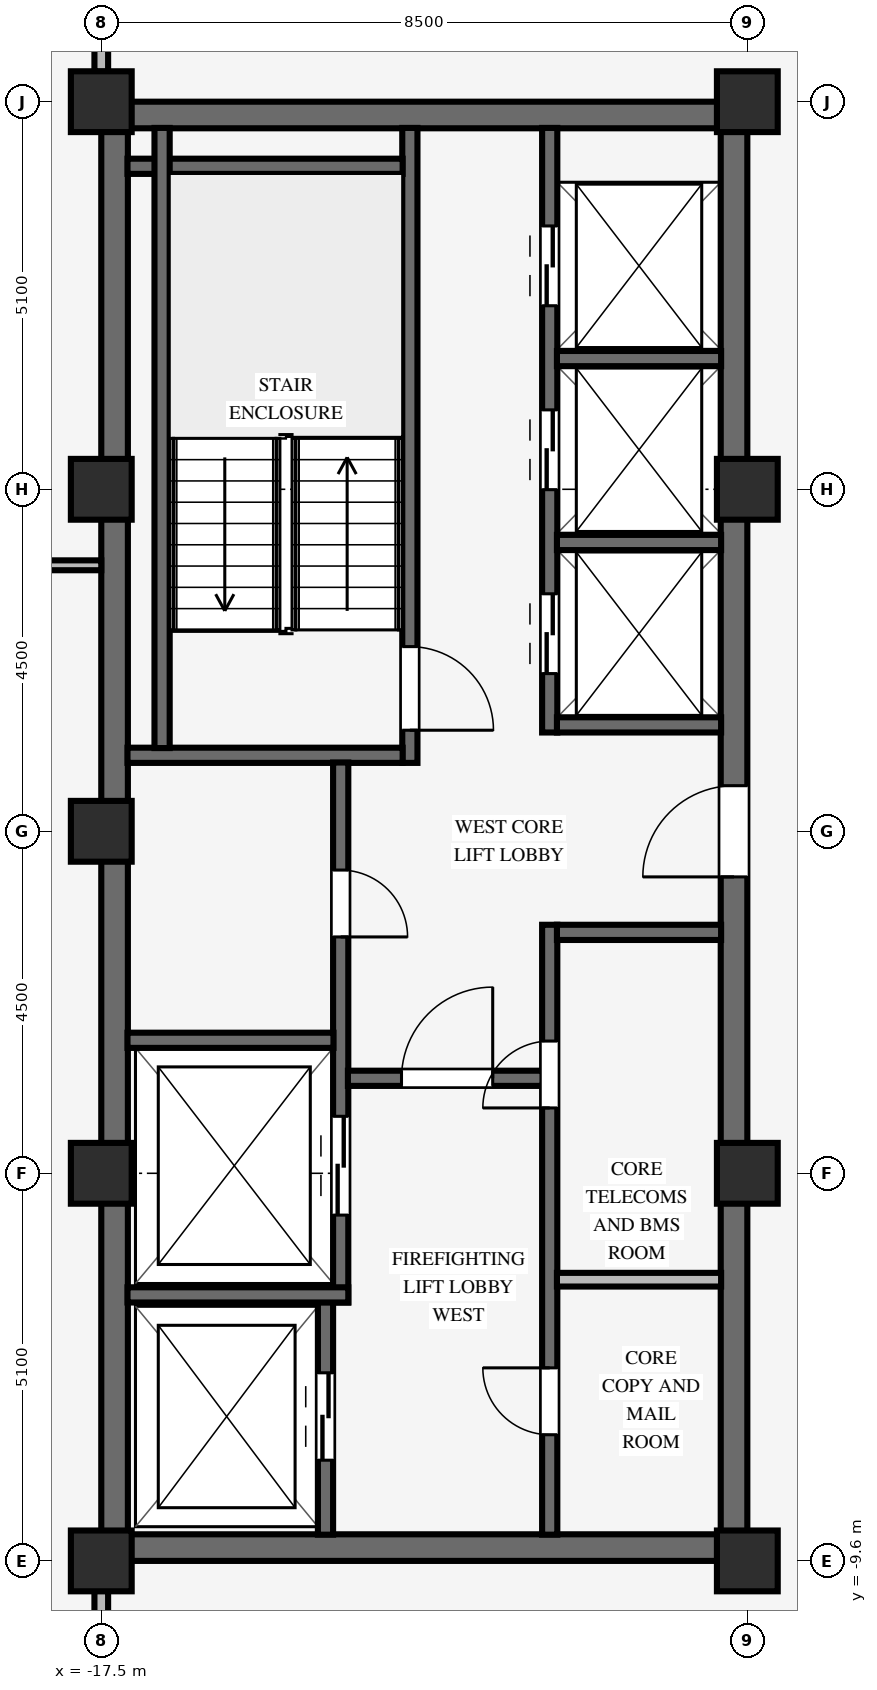
"""IFC4 building model, lengths in metres.
Left out: names, types, materials, properties, quantities, classifications, styles, units other than length and angle.
Written with IfcOpenShell. Run it as: python <this file> out.ifc"""

import sys

from ifc_helpers import new_model, si_unit, direction, frame, frame_2d, origin, origin_2d, place, context, subcontext, project, spatial, rectangle, extrude, source, transform, mapped, element, fill, save


model = new_model("IFC4")
c1 = context("Model", 3, precision=1e-05, world=origin(), true_north=direction((0.0, 1.0)))
c2 = subcontext(c1, "Body", "Model", "MODEL_VIEW")
j1 = project(units=[si_unit("LENGTHUNIT", "METRE"), si_unit("PLANEANGLEUNIT", "RADIAN")], contexts=[c1])
p1 = place(None, origin())
s1 = spatial("IfcSite", under=j1, at=p1, CompositionType="ELEMENT")
p2 = place(p1, origin())
s2 = spatial("IfcBuilding", under=s1, at=p2, CompositionType="ELEMENT")
p3 = place(p2, frame((0.0, 0.0, 257.95)))
s3 = spatial("IfcBuildingStorey", under=s2, at=p3, CompositionType="ELEMENT", Elevation=257.95)
for number, where, z_axis, x_axis in (
    (1, (-17.5, -9.425, 0.0), (0.0, 0.0, 1.0), (1.0, 0.0, 0.0)),
    (2, (-17.5, 9.425, 0.0), (0.0, 0.0, 1.0), (1.0, 0.0, 0.0)),
):
    element("IfcWall", number, at=place(p3, frame(where, z_axis=z_axis, x_axis=x_axis)), inside=s3, PredefinedType="SHEAR", context=c2, shape_type="SweptSolid", body=[
        extrude(rectangle(XDim=8.5, YDim=0.35, at=frame_2d((4.25, 0.0))), origin(), (0.0, 0.0, 1.0), 3.37),
    ])
p4 = place(p3, frame((-17.325, -9.255, 0.0), z_axis=(0.0, 0.0, 1.0), x_axis=(0.0, 1.0, 0.0)))
e3 = element("IfcWall", 3, at=p4, inside=s3, PredefinedType="SHEAR", context=c2, shape_type="SweptSolid", body=[
    extrude(rectangle(XDim=18.51, YDim=0.35, at=frame_2d((9.255, 0.0))), origin(), (0.0, 0.0, 1.0), 3.37),
])
p5 = place(p3, frame((-9.175, -9.255, 0.0), z_axis=(0.0, 0.0, 1.0), x_axis=(0.0, 1.0, 0.0)))
e4 = element("IfcWall", 4, at=p5, inside=s3, PredefinedType="SHEAR", context=c2, shape_type="SweptSolid", body=[
    extrude(rectangle(XDim=18.51, YDim=0.35, at=frame_2d((9.255, 0.0))), origin(), (0.0, 0.0, 1.0), 3.37),
])
p6 = place(p5, frame((8.655, 0.0, 0.0)))
e5 = element("IfcOpeningElement", 5, at=p6, cuts=e4, PredefinedType="OPENING", context=c2, shape_type="SweptSolid", body=[
    extrude(rectangle(XDim=1.2, YDim=2.15, at=frame_2d((0.6, 1.075))), frame((0.0, 0.185, 0.0), z_axis=(0.0, -1.0, 0.0), x_axis=(1.0, 0.0, 0.0)), (0.0, 0.0, 1.0), 0.37),
])
for number, where, z_axis, x_axis in (
    (6, (-17.5, -9.6, 0.0), (0.0, 0.0, 1.0), (1.0, 0.0, 0.0)),
    (7, (-17.5, -4.5, 0.0), (0.0, 0.0, 1.0), (1.0, 0.0, 0.0)),
    (8, (-17.5, 4.5, 0.0), (0.0, 0.0, 1.0), (1.0, 0.0, 0.0)),
    (9, (-17.5, 9.6, 0.0), (0.0, 0.0, 1.0), (1.0, 0.0, 0.0)),
    (10, (-9.0, -9.6, 0.0), (0.0, 0.0, 1.0), (1.0, 0.0, 0.0)),
    (11, (-9.0, -4.5, 0.0), (0.0, 0.0, 1.0), (1.0, 0.0, 0.0)),
    (12, (-9.0, 4.5, 0.0), (0.0, 0.0, 1.0), (1.0, 0.0, 0.0)),
    (13, (-9.0, 9.6, 0.0), (0.0, 0.0, 1.0), (1.0, 0.0, 0.0)),
    (14, (-17.5, 0.0, 0.0), (0.0, 0.0, 1.0), (1.0, 0.0, 0.0)),
):
    element("IfcColumn", number, at=place(p3, frame(where, z_axis=z_axis, x_axis=x_axis)), inside=s3, PredefinedType="COLUMN", context=c2, shape_type="SweptSolid", body=[
        extrude(rectangle(XDim=0.8, YDim=0.8, at=origin_2d()), origin(), (0.0, 0.0, 1.0), 3.37),
    ])
p7 = place(p3, frame((-13.44, 0.9, 0.0), z_axis=(0.0, 0.0, 1.0), x_axis=(0.0, 1.0, 0.0)))
e15 = element("IfcWall", 15, at=p7, inside=s3, PredefinedType="SHEAR", context=c2, shape_type="SweptSolid", body=[
    extrude(rectangle(XDim=8.355, YDim=0.2, at=frame_2d((4.177, 0.0))), origin(), (0.0, 0.0, 1.0), 3.37),
])
p8 = place(p7, frame((1.53, 0.0, 0.0), z_axis=(0.0, 0.0, 1.0), x_axis=(-1.0, 0.0, 0.0)))
e16 = element("IfcOpeningElement", 16, at=p8, cuts=e15, PredefinedType="OPENING", context=c2, shape_type="SweptSolid", body=[
    extrude(rectangle(XDim=1.1, YDim=2.15, at=frame_2d((0.55, 1.075))), frame((0.0, 0.11, 0.0), z_axis=(0.0, -1.0, 0.0), x_axis=(1.0, 0.0, 0.0)), (0.0, 0.0, 1.0), 0.22),
])
for number, where, z_axis, x_axis in (
    (17, (-17.155, 1.0, 0.0), (0.0, 0.0, 1.0), (1.0, 0.0, 0.0)),
    (18, (-17.155, 8.75, 0.0), (0.0, 0.0, 1.0), (1.0, 0.0, 0.0)),
):
    element("IfcWall", number, at=place(p3, frame(where, z_axis=z_axis, x_axis=x_axis)), inside=s3, PredefinedType="SHEAR", context=c2, shape_type="SweptSolid", body=[
        extrude(rectangle(XDim=3.62, YDim=0.2, at=frame_2d((1.81, 0.0))), origin(), (0.0, 0.0, 1.0), 3.37),
    ])
p9 = place(p3, frame((-16.7, 1.095, 0.0), z_axis=(0.0, 0.0, 1.0), x_axis=(0.0, 1.0, 0.0)))
e19 = element("IfcWall", 19, at=p9, inside=s3, PredefinedType="SHEAR", context=c2, shape_type="SweptSolid", body=[
    extrude(rectangle(XDim=8.16, YDim=0.2, at=frame_2d((4.08, 0.0))), origin(), (0.0, 0.0, 1.0), 3.37),
])
p10 = place(p3, frame((-14.55, -9.255, 0.0), z_axis=(0.0, 0.0, 1.0), x_axis=(0.0, 1.0, 0.0)))
e20 = element("IfcWall", 20, at=p10, inside=s3, PredefinedType="SHEAR", context=c2, shape_type="SweptSolid", body=[
    extrude(rectangle(XDim=3.06, YDim=0.2, at=frame_2d((1.53, 0.0))), origin(), (0.0, 0.0, 1.0), 3.37),
])
p11 = place(p10, frame((0.98, 0.0, 0.0)))
e21 = element("IfcOpeningElement", 21, at=p11, cuts=e20, PredefinedType="OPENING", context=c2, shape_type="SweptSolid", body=[
    extrude(rectangle(XDim=1.15, YDim=2.15, at=frame_2d((0.575, 1.075))), frame((0.0, 0.11, 0.0), z_axis=(0.0, -1.0, 0.0), x_axis=(1.0, 0.0, 0.0)), (0.0, 0.0, 1.0), 0.22),
])
p12 = place(p3, frame((-14.35, -6.2, 0.0), z_axis=(0.0, 0.0, 1.0), x_axis=(0.0, 1.0, 0.0)))
e22 = element("IfcWall", 22, at=p12, inside=s3, PredefinedType="SHEAR", context=c2, shape_type="SweptSolid", body=[
    extrude(rectangle(XDim=7.105, YDim=0.2, at=frame_2d((3.552, 0.0))), origin(), (0.0, 0.0, 1.0), 3.37),
])
p13 = place(p12, frame((5.69, 0.0, 0.0), z_axis=(0.0, 0.0, 1.0), x_axis=(-1.0, 0.0, 0.0)))
e23 = element("IfcOpeningElement", 23, at=p13, cuts=e22, PredefinedType="OPENING", context=c2, shape_type="SweptSolid", body=[
    extrude(rectangle(XDim=0.88, YDim=2.1, at=frame_2d((0.44, 1.05))), frame((0.0, 0.11, 0.0), z_axis=(0.0, -1.0, 0.0), x_axis=(1.0, 0.0, 0.0)), (0.0, 0.0, 1.0), 0.22),
])
p14 = place(p12, frame((1.15, 0.0, 0.0)))
e24 = element("IfcOpeningElement", 24, at=p14, cuts=e22, PredefinedType="OPENING", context=c2, shape_type="SweptSolid", body=[
    extrude(rectangle(XDim=1.3, YDim=2.2, at=frame_2d((0.65, 1.1))), frame((0.0, 0.11, 0.0), z_axis=(0.0, -1.0, 0.0), x_axis=(1.0, 0.0, 0.0)), (0.0, 0.0, 1.0), 0.22),
])
p15 = place(p3, frame((-17.155, -6.1, 0.0), z_axis=(0.0, 0.0, 1.0), x_axis=(1.0, 0.0, 0.0)))
e25 = element("IfcWall", 25, at=p15, inside=s3, PredefinedType="SHEAR", context=c2, shape_type="SweptSolid", body=[
    extrude(rectangle(XDim=2.905, YDim=0.2, at=frame_2d((1.453, 0.0))), origin(), (0.0, 0.0, 1.0), 3.37),
])
p16 = place(p3, frame((-17.155, -2.75, 0.0), z_axis=(0.0, 0.0, 1.0), x_axis=(1.0, 0.0, 0.0)))
e26 = element("IfcWall", 26, at=p16, inside=s3, PredefinedType="SHEAR", context=c2, shape_type="SweptSolid", body=[
    extrude(rectangle(XDim=2.71, YDim=0.2, at=frame_2d((1.355, 0.0))), origin(), (0.0, 0.0, 1.0), 3.37),
])
p17 = place(p3, frame((-11.6, -9.255, 0.0), z_axis=(0.0, 0.0, 1.0), x_axis=(0.0, 1.0, 0.0)))
e27 = element("IfcWall", 27, at=p17, inside=s3, PredefinedType="SHEAR", context=c2, shape_type="SweptSolid", body=[
    extrude(rectangle(XDim=8.025, YDim=0.2, at=frame_2d((4.012, 0.0))), origin(), (0.0, 0.0, 1.0), 3.37),
])
p18 = place(p17, frame((1.315, 0.0, 0.0)))
e28 = element("IfcOpeningElement", 28, at=p18, cuts=e27, PredefinedType="OPENING", context=c2, shape_type="SweptSolid", body=[
    extrude(rectangle(XDim=0.88, YDim=2.1, at=frame_2d((0.44, 1.05))), frame((0.0, 0.11, 0.0), z_axis=(0.0, -1.0, 0.0), x_axis=(1.0, 0.0, 0.0)), (0.0, 0.0, 1.0), 0.22),
])
p19 = place(p17, frame((5.615, 0.0, 0.0)))
e29 = element("IfcOpeningElement", 29, at=p19, cuts=e27, PredefinedType="OPENING", context=c2, shape_type="SweptSolid", body=[
    extrude(rectangle(XDim=0.88, YDim=2.1, at=frame_2d((0.44, 1.05))), frame((0.0, 0.11, 0.0), z_axis=(0.0, -1.0, 0.0), x_axis=(1.0, 0.0, 0.0)), (0.0, 0.0, 1.0), 0.22),
])
p20 = place(p3, frame((-14.255, -3.25, 0.0), z_axis=(0.0, 0.0, 1.0), x_axis=(1.0, 0.0, 0.0)))
e30 = element("IfcWall", 30, at=p20, inside=s3, PredefinedType="SHEAR", context=c2, shape_type="SweptSolid", body=[
    extrude(rectangle(XDim=2.56, YDim=0.2, at=frame_2d((1.28, 0.0))), origin(), (0.0, 0.0, 1.0), 3.37),
])
p21 = place(p20, frame((0.705, 0.0, 0.0)))
e31 = element("IfcOpeningElement", 31, at=p21, cuts=e30, PredefinedType="OPENING", context=c2, shape_type="SweptSolid", body=[
    extrude(rectangle(XDim=1.2, YDim=2.15, at=frame_2d((0.6, 1.075))), frame((0.0, 0.11, 0.0), z_axis=(0.0, -1.0, 0.0), x_axis=(1.0, 0.0, 0.0)), (0.0, 0.0, 1.0), 0.22),
])
p22 = place(p3, frame((-11.505, -1.33, 0.0), z_axis=(0.0, 0.0, 1.0), x_axis=(1.0, 0.0, 0.0)))
e32 = element("IfcWall", 32, at=p22, inside=s3, PredefinedType="SHEAR", context=c2, shape_type="SweptSolid", body=[
    extrude(rectangle(XDim=2.16, YDim=0.2, at=frame_2d((1.08, 0.0))), origin(), (0.0, 0.0, 1.0), 3.37),
])
p23 = place(p3, frame((-11.505, -5.9, 0.0), z_axis=(0.0, 0.0, 1.0), x_axis=(1.0, 0.0, 0.0)))
e33 = element("IfcWall", 33, at=p23, inside=s3, PredefinedType="PARTITIONING", context=c2, shape_type="SweptSolid", body=[
    extrude(rectangle(XDim=2.16, YDim=0.18, at=frame_2d((1.08, 0.0))), origin(), (0.0, 0.0, 1.0), 3.36),
])
p24 = place(p3, frame((-11.6, 1.3, 0.0), z_axis=(0.0, 0.0, 1.0), x_axis=(0.0, 1.0, 0.0)))
e34 = element("IfcWall", 34, at=p24, inside=s3, PredefinedType="SHEAR", context=c2, shape_type="SweptSolid", body=[
    extrude(rectangle(XDim=7.955, YDim=0.2, at=frame_2d((3.978, 0.0))), origin(), (0.0, 0.0, 1.0), 3.37),
])
p25 = place(p24, frame((0.775, 0.0, 0.0)))
e35 = element("IfcOpeningElement", 35, at=p25, cuts=e34, PredefinedType="OPENING", context=c2, shape_type="SweptSolid", body=[
    extrude(rectangle(XDim=1.05, YDim=2.15, at=frame_2d((0.525, 1.075))), frame((0.0, 0.11, 0.0), z_axis=(0.0, -1.0, 0.0), x_axis=(1.0, 0.0, 0.0)), (0.0, 0.0, 1.0), 0.22),
])
p26 = place(p24, frame((3.195, 0.0, 0.0)))
e36 = element("IfcOpeningElement", 36, at=p26, cuts=e34, PredefinedType="OPENING", context=c2, shape_type="SweptSolid", body=[
    extrude(rectangle(XDim=1.05, YDim=2.15, at=frame_2d((0.525, 1.075))), frame((0.0, 0.11, 0.0), z_axis=(0.0, -1.0, 0.0), x_axis=(1.0, 0.0, 0.0)), (0.0, 0.0, 1.0), 0.22),
])
p27 = place(p24, frame((5.615, 0.0, 0.0)))
e37 = element("IfcOpeningElement", 37, at=p27, cuts=e34, PredefinedType="OPENING", context=c2, shape_type="SweptSolid", body=[
    extrude(rectangle(XDim=1.05, YDim=2.15, at=frame_2d((0.525, 1.075))), frame((0.0, 0.11, 0.0), z_axis=(0.0, -1.0, 0.0), x_axis=(1.0, 0.0, 0.0)), (0.0, 0.0, 1.0), 0.22),
])
for number, where, z_axis, x_axis in (
    (38, (-11.505, 1.4, 0.0), (0.0, 0.0, 1.0), (1.0, 0.0, 0.0)),
    (39, (-11.505, 3.8, 0.0), (0.0, 0.0, 1.0), (1.0, 0.0, 0.0)),
    (40, (-11.505, 6.22, 0.0), (0.0, 0.0, 1.0), (1.0, 0.0, 0.0)),
):
    element("IfcWall", number, at=place(p3, frame(where, z_axis=z_axis, x_axis=x_axis)), inside=s3, PredefinedType="SHEAR", context=c2, shape_type="SweptSolid", body=[
        extrude(rectangle(XDim=2.16, YDim=0.2, at=frame_2d((1.08, 0.0))), origin(), (0.0, 0.0, 1.0), 3.37),
    ])
p28 = place(p3, frame((-20.7, 3.5, 0.0), z_axis=(0.0, 0.0, 1.0), x_axis=(1.0, 0.0, 0.0)))
e41 = element("IfcWall", 41, at=p28, inside=s3, PredefinedType="PARTITIONING", context=c2, shape_type="SweptSolid", body=[
    extrude(rectangle(XDim=3.2, YDim=0.13, at=frame_2d((1.6, 0.0))), origin(), (0.0, 0.0, 1.0), 3.36),
])
for number, where, z_axis, x_axis in (
    (42, (-17.5, -11.114, 0.0), (0.0, 0.0, 1.0), (0.0, 1.0, 0.0)),
    (43, (-17.5, 9.996, 0.0), (0.0, 0.0, 1.0), (0.0, 1.0, 0.0)),
):
    element("IfcWall", number, at=place(p3, frame(where, z_axis=z_axis, x_axis=x_axis)), inside=s3, PredefinedType="PARTITIONING", context=c2, shape_type="SweptSolid", body=[
        extrude(rectangle(XDim=1.118, YDim=0.18, at=frame_2d((0.559, 0.0))), origin(), (0.0, 0.0, 1.0), 2.892),
    ])
m1 = source(origin(), c2, "Body", "SweptSolid", [
    extrude(rectangle(XDim=1.1, YDim=2.15, at=frame_2d((0.55, 1.075))), frame((0.0, 0.025, 0.0), z_axis=(0.0, -1.0, 0.0), x_axis=(1.0, 0.0, 0.0)), (0.0, 0.0, 1.0), 0.05),
])
p29 = place(p8, origin())
e44 = element("IfcDoor", 44, at=p29, inside=s3, OperationType="SINGLE_SWING_RIGHT", PredefinedType="DOOR", context=c2, shape_type="MappedRepresentation", body=[
    mapped(m1, transform((0.0, 0.0, 0.0), scale=1.0)),
])
fill(e16, e44)
m2 = source(origin(), c2, "Body", "SweptSolid", [
    extrude(rectangle(XDim=0.88, YDim=2.1, at=frame_2d((0.44, 1.05))), frame((0.0, 0.025, 0.0), z_axis=(0.0, -1.0, 0.0), x_axis=(1.0, 0.0, 0.0)), (0.0, 0.0, 1.0), 0.05),
])
p30 = place(p13, origin())
e45 = element("IfcDoor", 45, at=p30, inside=s3, OperationType="SINGLE_SWING_RIGHT", PredefinedType="DOOR", context=c2, shape_type="MappedRepresentation", body=[
    mapped(m2, transform((0.0, 0.0, 0.0), scale=1.0)),
])
fill(e23, e45)
m3 = source(origin(), c2, "Body", "SweptSolid", [
    extrude(rectangle(XDim=1.2, YDim=2.15, at=frame_2d((0.6, 1.075))), frame((0.0, 0.025, 0.0), z_axis=(0.0, -1.0, 0.0), x_axis=(1.0, 0.0, 0.0)), (0.0, 0.0, 1.0), 0.05),
])
p31 = place(p21, origin())
e46 = element("IfcDoor", 46, at=p31, inside=s3, OperationType="SINGLE_SWING_RIGHT", PredefinedType="DOOR", context=c2, shape_type="MappedRepresentation", body=[
    mapped(m3, transform((0.0, 0.0, 0.0), scale=1.0)),
])
fill(e31, e46)
p32 = place(p18, origin())
e47 = element("IfcDoor", 47, at=p32, inside=s3, OperationType="SINGLE_SWING_RIGHT", PredefinedType="DOOR", context=c2, shape_type="MappedRepresentation", body=[
    mapped(m2, transform((0.0, 0.0, 0.0), scale=1.0)),
])
fill(e28, e47)
p33 = place(p19, origin())
e48 = element("IfcDoor", 48, at=p33, inside=s3, OperationType="SINGLE_SWING_LEFT", PredefinedType="DOOR", context=c2, shape_type="MappedRepresentation", body=[
    mapped(m2, transform((0.0, 0.0, 0.0), scale=1.0)),
])
fill(e29, e48)
p34 = place(p6, origin())
e49 = element("IfcDoor", 49, at=p34, inside=s3, OperationType="SINGLE_SWING_LEFT", PredefinedType="DOOR", context=c2, shape_type="MappedRepresentation", body=[
    mapped(m3, transform((0.0, 0.0, 0.0), scale=1.0)),
])
fill(e5, e49)
m4 = source(origin(), c2, "Body", "SweptSolid", [
    extrude(rectangle(XDim=1.15, YDim=2.15, at=frame_2d((0.575, 1.075))), frame((0.0, 0.025, 0.0), z_axis=(0.0, -1.0, 0.0), x_axis=(1.0, 0.0, 0.0)), (0.0, 0.0, 1.0), 0.05),
])
p35 = place(p11, origin())
e50 = element("IfcDoor", 50, at=p35, inside=s3, OperationType="DOUBLE_DOOR_SLIDING", PredefinedType="DOOR", context=c2, shape_type="MappedRepresentation", body=[
    mapped(m4, transform((0.0, 0.0, 0.0), scale=1.0)),
])
fill(e21, e50)
m5 = source(origin(), c2, "Body", "SweptSolid", [
    extrude(rectangle(XDim=1.3, YDim=2.2, at=frame_2d((0.65, 1.1))), frame((0.0, 0.025, 0.0), z_axis=(0.0, -1.0, 0.0), x_axis=(1.0, 0.0, 0.0)), (0.0, 0.0, 1.0), 0.05),
])
p36 = place(p14, origin())
e51 = element("IfcDoor", 51, at=p36, inside=s3, OperationType="DOUBLE_DOOR_SLIDING", PredefinedType="DOOR", context=c2, shape_type="MappedRepresentation", body=[
    mapped(m5, transform((0.0, 0.0, 0.0), scale=1.0)),
])
fill(e24, e51)
m6 = source(origin(), c2, "Body", "SweptSolid", [
    extrude(rectangle(XDim=1.05, YDim=2.15, at=frame_2d((0.525, 1.075))), frame((0.0, 0.025, 0.0), z_axis=(0.0, -1.0, 0.0), x_axis=(1.0, 0.0, 0.0)), (0.0, 0.0, 1.0), 0.05),
])
p37 = place(p25, origin())
e52 = element("IfcDoor", 52, at=p37, inside=s3, OperationType="DOUBLE_DOOR_SLIDING", PredefinedType="DOOR", context=c2, shape_type="MappedRepresentation", body=[
    mapped(m6, transform((0.0, 0.0, 0.0), scale=1.0)),
])
fill(e35, e52)
p38 = place(p26, origin())
e53 = element("IfcDoor", 53, at=p38, inside=s3, OperationType="DOUBLE_DOOR_SLIDING", PredefinedType="DOOR", context=c2, shape_type="MappedRepresentation", body=[
    mapped(m6, transform((0.0, 0.0, 0.0), scale=1.0)),
])
fill(e36, e53)
p39 = place(p27, origin())
e54 = element("IfcDoor", 54, at=p39, inside=s3, OperationType="DOUBLE_DOOR_SLIDING", PredefinedType="DOOR", context=c2, shape_type="MappedRepresentation", body=[
    mapped(m6, transform((0.0, 0.0, 0.0), scale=1.0)),
])
fill(e37, e54)
save(model, sys.argv[1])
